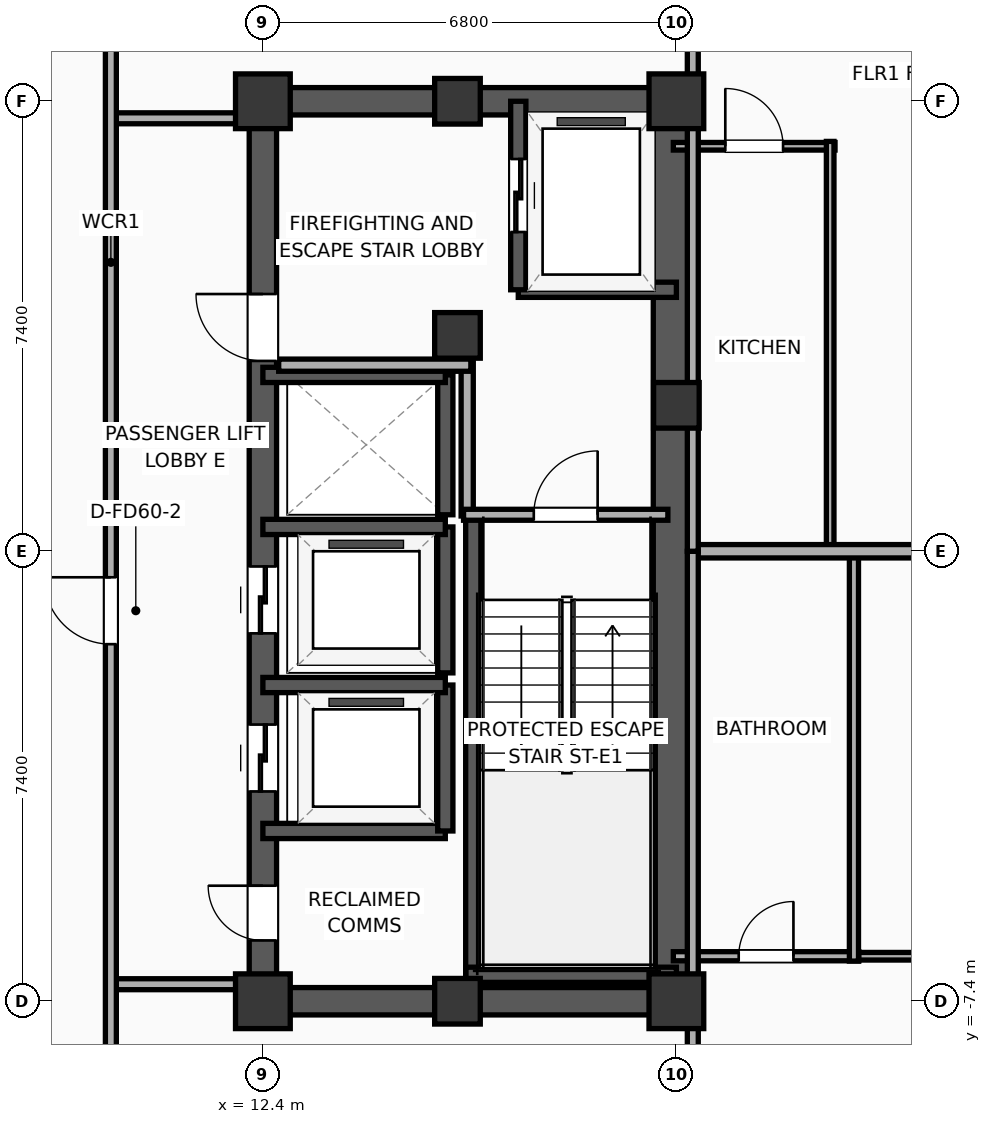
"""IFC4 building model, lengths in metres.
Left out: names, types, materials, properties, quantities, classifications, styles, units other than length and angle.
Written with IfcOpenShell. Run it as: python <this file> out.ifc"""

import sys

from ifc_helpers import new_model, si_unit, direction, frame, frame_2d, origin, origin_2d, place, context, subcontext, project, spatial, rectangle, extrude, element, fill, save


model = new_model("IFC4")
c1 = context("Model", 3, precision=1e-05, world=origin(), true_north=direction((0.0, 1.0)))
c2 = subcontext(c1, "Body", "Model", "MODEL_VIEW")
j1 = project(units=[si_unit("LENGTHUNIT", "METRE"), si_unit("PLANEANGLEUNIT", "RADIAN")], contexts=[c1])
p1 = place(None, origin())
s1 = spatial("IfcSite", under=j1, at=p1, CompositionType="ELEMENT")
p2 = place(p1, origin())
s2 = spatial("IfcBuilding", under=s1, at=p2, CompositionType="ELEMENT")
p3 = place(p2, frame((0.0, 0.0, 183.3)))
s3 = spatial("IfcBuildingStorey", under=s2, at=p3, CompositionType="ELEMENT", Elevation=183.3)
p4 = place(p3, frame((12.4, -7.4, 0.0), z_axis=(0.0, 0.0, 1.0), x_axis=(1.0, 0.0, 0.0)))
e1 = element("IfcColumn", 1, at=p4, inside=s3, PredefinedType="COLUMN", context=c2, shape_type="SweptSolid", body=[
    extrude(rectangle(XDim=0.9, YDim=0.9, at=origin_2d()), origin(), (0.0, 0.0, 1.0), 3.9),
])
p5 = place(p3, frame((15.6, 3.55, 0.0), z_axis=(0.0, 0.0, 1.0), x_axis=(1.0, 0.0, 0.0)))
e2 = element("IfcColumn", 2, at=p5, inside=s3, PredefinedType="COLUMN", context=c2, shape_type="SweptSolid", body=[
    extrude(rectangle(XDim=0.75, YDim=0.75, at=origin_2d()), origin(), (0.0, 0.0, 1.0), 3.9),
])
p6 = place(p3, frame((12.4, 7.4, 0.0), z_axis=(0.0, 0.0, 1.0), x_axis=(1.0, 0.0, 0.0)))
e3 = element("IfcColumn", 3, at=p6, inside=s3, PredefinedType="COLUMN", context=c2, shape_type="SweptSolid", body=[
    extrude(rectangle(XDim=0.9, YDim=0.9, at=origin_2d()), origin(), (0.0, 0.0, 1.0), 3.9),
])
for number, where, z_axis, x_axis in (
    (4, (15.6, -7.4, 0.0), (0.0, 0.0, 1.0), (1.0, 0.0, 0.0)),
    (5, (15.6, 7.4, 0.0), (0.0, 0.0, 1.0), (1.0, 0.0, 0.0)),
):
    element("IfcColumn", number, at=place(p3, frame(where, z_axis=z_axis, x_axis=x_axis)), inside=s3, PredefinedType="COLUMN", context=c2, shape_type="SweptSolid", body=[
        extrude(rectangle(XDim=0.75, YDim=0.75, at=origin_2d()), origin(), (0.0, 0.0, 1.0), 3.9),
    ])
p7 = place(p3, frame((19.2, -7.4, 0.0), z_axis=(0.0, 0.0, 1.0), x_axis=(1.0, 0.0, 0.0)))
e6 = element("IfcColumn", 6, at=p7, inside=s3, PredefinedType="COLUMN", context=c2, shape_type="SweptSolid", body=[
    extrude(rectangle(XDim=0.9, YDim=0.9, at=origin_2d()), origin(), (0.0, 0.0, 1.0), 3.9),
])
p8 = place(p3, frame((19.2, 2.4, 0.0), z_axis=(0.0, 0.0, 1.0), x_axis=(1.0, 0.0, 0.0)))
e7 = element("IfcColumn", 7, at=p8, inside=s3, PredefinedType="COLUMN", context=c2, shape_type="SweptSolid", body=[
    extrude(rectangle(XDim=0.75, YDim=0.75, at=origin_2d()), origin(), (0.0, 0.0, 1.0), 3.9),
])
p9 = place(p3, frame((19.2, 7.4, 0.0), z_axis=(0.0, 0.0, 1.0), x_axis=(1.0, 0.0, 0.0)))
e8 = element("IfcColumn", 8, at=p9, inside=s3, PredefinedType="COLUMN", context=c2, shape_type="SweptSolid", body=[
    extrude(rectangle(XDim=0.9, YDim=0.9, at=origin_2d()), origin(), (0.0, 0.0, 1.0), 3.9),
])
for number, where, z_axis, x_axis in (
    (9, (12.175, -7.4, 0.0), (0.0, 0.0, 1.0), (1.0, 0.0, 0.0)),
    (10, (12.175, 7.4, 0.0), (0.0, 0.0, 1.0), (1.0, 0.0, 0.0)),
):
    element("IfcWall", number, at=place(p3, frame(where, z_axis=z_axis, x_axis=x_axis)), inside=s3, PredefinedType="SHEAR", context=c2, shape_type="SweptSolid", body=[
        extrude(rectangle(XDim=7.25, YDim=0.45, at=frame_2d((3.625, 0.0))), origin(), (0.0, 0.0, 1.0), 3.65),
    ])
p10 = place(p3, frame((12.4, -7.4, 0.0), z_axis=(0.0, 0.0, 1.0), x_axis=(0.0, 1.0, 0.0)))
e11 = element("IfcWall", 11, at=p10, inside=s3, PredefinedType="SHEAR", context=c2, shape_type="SweptSolid", body=[
    extrude(rectangle(XDim=14.8, YDim=0.45, at=frame_2d((7.4, 0.0))), origin(), (0.0, 0.0, 1.0), 3.65),
])
p11 = place(p10, frame((3.45, 0.0, 0.0)))
e12 = element("IfcOpeningElement", 12, at=p11, cuts=e11, PredefinedType="OPENING", context=c2, shape_type="SweptSolid", body=[
    extrude(rectangle(XDim=1.1, YDim=2.05, at=frame_2d((0.55, 1.025))), frame((0.0, 0.235, 0.0), z_axis=(0.0, -1.0, 0.0), x_axis=(1.0, 0.0, 0.0)), (0.0, 0.0, 1.0), 0.47),
])
p12 = place(p10, frame((6.05, 0.0, 0.0)))
e13 = element("IfcOpeningElement", 13, at=p12, cuts=e11, PredefinedType="OPENING", context=c2, shape_type="SweptSolid", body=[
    extrude(rectangle(XDim=1.1, YDim=2.05, at=frame_2d((0.55, 1.025))), frame((0.0, 0.235, 0.0), z_axis=(0.0, -1.0, 0.0), x_axis=(1.0, 0.0, 0.0)), (0.0, 0.0, 1.0), 0.47),
])
p13 = place(p10, frame((10.53, 0.0, 0.0)))
e14 = element("IfcOpeningElement", 14, at=p13, cuts=e11, PredefinedType="OPENING", context=c2, shape_type="SweptSolid", body=[
    extrude(rectangle(XDim=1.1, YDim=2.05, at=frame_2d((0.55, 1.025))), frame((0.0, 0.235, 0.0), z_axis=(0.0, -1.0, 0.0), x_axis=(1.0, 0.0, 0.0)), (0.0, 0.0, 1.0), 0.47),
])
p14 = place(p10, frame((1.0, 0.0, 0.0)))
e15 = element("IfcOpeningElement", 15, at=p14, cuts=e11, PredefinedType="OPENING", context=c2, shape_type="SweptSolid", body=[
    extrude(rectangle(XDim=0.9, YDim=2.05, at=frame_2d((0.45, 1.025))), frame((0.0, 0.235, 0.0), z_axis=(0.0, -1.0, 0.0), x_axis=(1.0, 0.0, 0.0)), (0.0, 0.0, 1.0), 0.47),
])
p15 = place(p3, frame((19.145, -7.4, 0.0), z_axis=(0.0, 0.0, 1.0), x_axis=(0.0, 1.0, 0.0)))
e16 = element("IfcWall", 16, at=p15, inside=s3, PredefinedType="SHEAR", context=c2, shape_type="SweptSolid", body=[
    extrude(rectangle(XDim=14.8, YDim=0.65, at=frame_2d((7.4, 0.0))), origin(), (0.0, 0.0, 1.0), 3.65),
])
p16 = place(p3, frame((15.86, -7.085, 0.0), z_axis=(0.0, 0.0, 1.0), x_axis=(0.0, 1.0, 0.0)))
e17 = element("IfcWall", 17, at=p16, inside=s3, PredefinedType="SOLIDWALL", context=c2, shape_type="SweptSolid", body=[
    extrude(rectangle(XDim=7.685, YDim=0.25, at=frame_2d((3.843, 0.0))), origin(), (0.0, 0.0, 1.0), 3.65),
])
p17 = place(p3, frame((15.74, -6.965, 0.0), z_axis=(0.0, 0.0, 1.0), x_axis=(1.0, 0.0, 0.0)))
e18 = element("IfcWall", 18, at=p17, inside=s3, PredefinedType="SOLIDWALL", context=c2, shape_type="SweptSolid", body=[
    extrude(rectangle(XDim=3.46, YDim=0.25, at=frame_2d((1.73, 0.0))), origin(), (0.0, 0.0, 1.0), 3.65),
])
p18 = place(p3, frame((16.6, 4.3, 0.0), z_axis=(0.0, 0.0, 1.0), x_axis=(1.0, 0.0, 0.0)))
e19 = element("IfcWall", 19, at=p18, inside=s3, PredefinedType="SOLIDWALL", context=c2, shape_type="SweptSolid", body=[
    extrude(rectangle(XDim=2.6, YDim=0.25, at=frame_2d((1.3, 0.0))), origin(), (0.0, 0.0, 1.0), 3.65),
])
p19 = place(p3, frame((16.6, 7.4, 0.0), z_axis=(0.0, 0.0, 1.0), x_axis=(0.0, -1.0, 0.0)))
e20 = element("IfcWall", 20, at=p19, inside=s3, PredefinedType="SOLIDWALL", context=c2, shape_type="SweptSolid", body=[
    extrude(rectangle(XDim=3.1, YDim=0.25, at=frame_2d((1.55, 0.0))), origin(), (0.0, 0.0, 1.0), 3.65),
])
p20 = place(p19, frame((0.95, 0.0, 0.0)))
e21 = element("IfcOpeningElement", 21, at=p20, cuts=e20, PredefinedType="OPENING", context=c2, shape_type="SweptSolid", body=[
    extrude(rectangle(XDim=1.2, YDim=2.05, at=frame_2d((0.6, 1.025))), frame((0.0, 0.135, 0.0), z_axis=(0.0, -1.0, 0.0), x_axis=(1.0, 0.0, 0.0)), (0.0, 0.0, 1.0), 0.27),
])
p21 = place(p3, frame((12.4, -4.6, 0.0), z_axis=(0.0, 0.0, 1.0), x_axis=(1.0, 0.0, 0.0)))
e22 = element("IfcWall", 22, at=p21, inside=s3, PredefinedType="SOLIDWALL", context=c2, shape_type="SweptSolid", body=[
    extrude(rectangle(XDim=3.0, YDim=0.25, at=frame_2d((1.5, 0.0))), origin(), (0.0, 0.0, 1.0), 3.65),
])
p22 = place(p3, frame((15.4, -4.6, 0.0), z_axis=(0.0, 0.0, 1.0), x_axis=(0.0, 1.0, 0.0)))
e23 = element("IfcWall", 23, at=p22, inside=s3, PredefinedType="SOLIDWALL", context=c2, shape_type="SweptSolid", body=[
    extrude(rectangle(XDim=2.4, YDim=0.25, at=frame_2d((1.2, 0.0))), origin(), (0.0, 0.0, 1.0), 3.65),
])
p23 = place(p3, frame((15.4, -2.2, 0.0), z_axis=(0.0, 0.0, 1.0), x_axis=(-1.0, 0.0, 0.0)))
e24 = element("IfcWall", 24, at=p23, inside=s3, PredefinedType="SOLIDWALL", context=c2, shape_type="SweptSolid", body=[
    extrude(rectangle(XDim=3.0, YDim=0.25, at=frame_2d((1.5, 0.0))), origin(), (0.0, 0.0, 1.0), 3.65),
])
p24 = place(p3, frame((15.4, -2.0, 0.0), z_axis=(0.0, 0.0, 1.0), x_axis=(0.0, 1.0, 0.0)))
e25 = element("IfcWall", 25, at=p24, inside=s3, PredefinedType="SOLIDWALL", context=c2, shape_type="SweptSolid", body=[
    extrude(rectangle(XDim=2.4, YDim=0.25, at=frame_2d((1.2, 0.0))), origin(), (0.0, 0.0, 1.0), 3.65),
])
p25 = place(p3, frame((15.4, 0.4, 0.0), z_axis=(0.0, 0.0, 1.0), x_axis=(-1.0, 0.0, 0.0)))
e26 = element("IfcWall", 26, at=p25, inside=s3, PredefinedType="SOLIDWALL", context=c2, shape_type="SweptSolid", body=[
    extrude(rectangle(XDim=3.0, YDim=0.25, at=frame_2d((1.5, 0.0))), origin(), (0.0, 0.0, 1.0), 3.65),
])
p26 = place(p3, frame((15.4, 0.6, 0.0), z_axis=(0.0, 0.0, 1.0), x_axis=(0.0, 1.0, 0.0)))
e27 = element("IfcWall", 27, at=p26, inside=s3, PredefinedType="SOLIDWALL", context=c2, shape_type="SweptSolid", body=[
    extrude(rectangle(XDim=2.3, YDim=0.25, at=frame_2d((1.15, 0.0))), origin(), (0.0, 0.0, 1.0), 3.65),
])
p27 = place(p3, frame((15.4, 2.9, 0.0), z_axis=(0.0, 0.0, 1.0), x_axis=(-1.0, 0.0, 0.0)))
e28 = element("IfcWall", 28, at=p27, inside=s3, PredefinedType="SOLIDWALL", context=c2, shape_type="SweptSolid", body=[
    extrude(rectangle(XDim=3.0, YDim=0.25, at=frame_2d((1.5, 0.0))), origin(), (0.0, 0.0, 1.0), 3.65),
])
p28 = place(p3, frame((15.76, 0.58, 0.0), z_axis=(0.0, 0.0, 1.0), x_axis=(0.0, 1.0, 0.0)))
e29 = element("IfcWall", 29, at=p28, inside=s3, PredefinedType="PARTITIONING", context=c2, shape_type="SweptSolid", body=[
    extrude(rectangle(XDim=2.52, YDim=0.2, at=frame_2d((1.26, 0.0))), origin(), (0.0, 0.0, 1.0), 3.65),
])
p29 = place(p3, frame((12.66, 3.06, 0.0), z_axis=(0.0, 0.0, 1.0), x_axis=(1.0, 0.0, 0.0)))
e30 = element("IfcWall", 30, at=p29, inside=s3, PredefinedType="PARTITIONING", context=c2, shape_type="SweptSolid", body=[
    extrude(rectangle(XDim=3.16, YDim=0.2, at=frame_2d((1.58, 0.0))), origin(), (0.0, 0.0, 1.0), 3.65),
])
p30 = place(p3, frame((15.7, 0.6, 0.0), z_axis=(0.0, 0.0, 1.0), x_axis=(1.0, 0.0, 0.0)))
e31 = element("IfcWall", 31, at=p30, inside=s3, PredefinedType="PARTITIONING", context=c2, shape_type="SweptSolid", body=[
    extrude(rectangle(XDim=3.36, YDim=0.18, at=frame_2d((1.68, 0.0))), origin(), (0.0, 0.0, 1.0), 3.65),
])
p31 = place(p30, frame((1.155, 0.0, 0.0)))
e32 = element("IfcOpeningElement", 32, at=p31, cuts=e31, PredefinedType="OPENING", context=c2, shape_type="SweptSolid", body=[
    extrude(rectangle(XDim=1.05, YDim=2.05, at=frame_2d((0.525, 1.025))), frame((0.0, 0.1, 0.0), z_axis=(0.0, -1.0, 0.0), x_axis=(1.0, 0.0, 0.0)), (0.0, 0.0, 1.0), 0.2),
])
for number, where, z_axis, x_axis in (
    (33, (9.88, 7.12, 0.0), (0.0, 0.0, 1.0), (1.0, 0.0, 0.0)),
    (34, (9.88, -7.12, 0.0), (0.0, 0.0, 1.0), (1.0, 0.0, 0.0)),
):
    element("IfcWall", number, at=place(p3, frame(where, z_axis=z_axis, x_axis=x_axis)), inside=s3, PredefinedType="PARTITIONING", context=c2, shape_type="SweptSolid", body=[
        extrude(rectangle(XDim=2.27, YDim=0.18, at=frame_2d((1.135, 0.0))), origin(), (0.0, 0.0, 1.0), 3.65),
    ])
p32 = place(p3, frame((9.9, -9.78, 0.0), z_axis=(0.0, 0.0, 1.0), x_axis=(0.0, 1.0, 0.0)))
e35 = element("IfcWall", 35, at=p32, inside=s3, PredefinedType="PARTITIONING", context=c2, shape_type="SweptSolid", body=[
    extrude(rectangle(XDim=19.56, YDim=0.18, at=frame_2d((9.78, 0.0))), origin(), (0.0, 0.0, 1.0), 3.65),
])
p33 = place(p32, frame((8.252, 0.0, 0.0)))
e36 = element("IfcOpeningElement", 36, at=p33, cuts=e35, PredefinedType="OPENING", context=c2, shape_type="SweptSolid", body=[
    extrude(rectangle(XDim=1.1, YDim=2.05, at=frame_2d((0.55, 1.025))), frame((0.0, 0.1, 0.0), z_axis=(0.0, -1.0, 0.0), x_axis=(1.0, 0.0, 0.0)), (0.0, 0.0, 1.0), 0.2),
])
p34 = place(p3, frame((22.06, -6.66, 0.0), z_axis=(0.0, 0.0, 1.0), x_axis=(1.0, 0.0, 0.0)))
e37 = element("IfcWall", 37, at=p34, inside=s3, PredefinedType="PARTITIONING", context=c2, shape_type="SweptSolid", body=[
    extrude(rectangle(XDim=5.321, YDim=0.125, at=frame_2d((2.661, 0.0))), origin(), (0.0, 0.0, 1.0), 3.65),
])
p35 = place(p34, frame((1.945, 0.0, 0.0)))
e38 = element("IfcOpeningElement", 38, at=p35, cuts=e37, PredefinedType="OPENING", context=c2, shape_type="SweptSolid", body=[
    extrude(rectangle(XDim=0.9, YDim=2.05, at=frame_2d((0.45, 1.025))), frame((0.0, 0.073, 0.0), z_axis=(0.0, -1.0, 0.0), x_axis=(1.0, 0.0, 0.0)), (0.0, 0.0, 1.0), 0.145),
])
p36 = place(p3, frame((19.15, -6.66, 0.0), z_axis=(0.0, 0.0, 1.0), x_axis=(1.0, 0.0, 0.0)))
e39 = element("IfcWall", 39, at=p36, inside=s3, PredefinedType="PLUMBINGWALL", context=c2, shape_type="SweptSolid", body=[
    extrude(rectangle(XDim=3.05, YDim=0.15, at=frame_2d((1.525, 0.0))), origin(), (0.0, 0.0, 1.0), 3.04),
])
p37 = place(p36, frame((1.075, 0.0, 0.0)))
e40 = element("IfcOpeningElement", 40, at=p37, cuts=e39, PredefinedType="OPENING", context=c2, shape_type="SweptSolid", body=[
    extrude(rectangle(XDim=0.9, YDim=2.05, at=frame_2d((0.45, 1.025))), frame((0.0, 0.085, 0.0), z_axis=(0.0, -1.0, 0.0), x_axis=(1.0, 0.0, 0.0)), (0.0, 0.0, 1.0), 0.17),
])
p38 = place(p3, frame((22.12, -6.74, 0.0), z_axis=(0.0, 0.0, 1.0), x_axis=(0.0, 1.0, 0.0)))
e41 = element("IfcWall", 41, at=p38, inside=s3, PredefinedType="PLUMBINGWALL", context=c2, shape_type="SweptSolid", body=[
    extrude(rectangle(XDim=6.72, YDim=0.15, at=frame_2d((3.36, 0.0))), origin(), (0.0, 0.0, 1.0), 3.65),
])
p39 = place(p3, frame((19.15, 6.66, 0.0), z_axis=(0.0, 0.0, 1.0), x_axis=(1.0, 0.0, 0.0)))
e42 = element("IfcWall", 42, at=p39, inside=s3, PredefinedType="PARTITIONING", context=c2, shape_type="SweptSolid", body=[
    extrude(rectangle(XDim=2.659, YDim=0.125, at=frame_2d((1.33, 0.0))), origin(), (0.0, 0.0, 1.0), 3.65),
])
p40 = place(p39, frame((0.854, 0.0, 0.0)))
e43 = element("IfcOpeningElement", 43, at=p40, cuts=e42, PredefinedType="OPENING", context=c2, shape_type="SweptSolid", body=[
    extrude(rectangle(XDim=0.95, YDim=2.05, at=frame_2d((0.475, 1.025))), frame((0.0, 0.073, 0.0), z_axis=(0.0, -1.0, 0.0), x_axis=(1.0, 0.0, 0.0)), (0.0, 0.0, 1.0), 0.145),
])
p41 = place(p3, frame((21.729, 0.02, 0.0), z_axis=(0.0, 0.0, 1.0), x_axis=(0.0, 1.0, 0.0)))
e44 = element("IfcWall", 44, at=p41, inside=s3, PredefinedType="PARTITIONING", context=c2, shape_type="SweptSolid", body=[
    extrude(rectangle(XDim=6.72, YDim=0.125, at=frame_2d((3.36, 0.0))), origin(), (0.0, 0.0, 1.0), 3.65),
])
p42 = place(p3, frame((19.47, 0.0, 0.0), z_axis=(0.0, 0.0, 1.0), x_axis=(1.0, 0.0, 0.0)))
e45 = element("IfcWall", 45, at=p42, inside=s3, PredefinedType="PARTITIONING", context=c2, shape_type="SweptSolid", body=[
    extrude(rectangle(XDim=7.06, YDim=0.22, at=frame_2d((3.53, 0.0))), origin(), (0.0, 0.0, 1.0), 3.65),
])
p43 = place(p3, frame((19.47, -18.559, 0.0), z_axis=(0.0, 0.0, 1.0), x_axis=(0.0, 1.0, 0.0)))
e46 = element("IfcWall", 46, at=p43, inside=s3, PredefinedType="PARTITIONING", context=c2, shape_type="SweptSolid", body=[
    extrude(rectangle(XDim=18.559, YDim=0.18, at=frame_2d((9.279, 0.0))), origin(), (0.0, 0.0, 1.0), 3.65),
])
p44 = place(p43, frame((7.679, 0.0, 0.0)))
e47 = element("IfcOpeningElement", 47, at=p44, cuts=e46, PredefinedType="OPENING", context=c2, shape_type="SweptSolid", body=[
    extrude(rectangle(XDim=0.9, YDim=2.05, at=frame_2d((0.45, 1.025))), frame((0.0, 0.1, 0.0), z_axis=(0.0, -1.0, 0.0), x_axis=(1.0, 0.0, 0.0)), (0.0, 0.0, 1.0), 0.2),
])
p45 = place(p3, frame((19.47, 0.0, 0.0), z_axis=(0.0, 0.0, 1.0), x_axis=(0.0, 1.0, 0.0)))
e48 = element("IfcWall", 48, at=p45, inside=s3, PredefinedType="PARTITIONING", context=c2, shape_type="SweptSolid", body=[
    extrude(rectangle(XDim=22.124, YDim=0.18, at=frame_2d((11.062, 0.0))), origin(), (0.0, 0.0, 1.0), 3.04),
])
p46 = place(p45, frame((9.979, 0.0, 0.0)))
e49 = element("IfcOpeningElement", 49, at=p46, cuts=e48, PredefinedType="OPENING", context=c2, shape_type="SweptSolid", body=[
    extrude(rectangle(XDim=0.9, YDim=2.05, at=frame_2d((0.45, 1.025))), frame((0.0, 0.1, 0.0), z_axis=(0.0, -1.0, 0.0), x_axis=(1.0, 0.0, 0.0)), (0.0, 0.0, 1.0), 0.2),
])
p47 = place(p20, origin())
e50 = element("IfcDoor", 50, at=p47, inside=s3, OperationType="SLIDING_TO_LEFT", PredefinedType="DOOR", context=c2, shape_type="SweptSolid", body=[
    extrude(rectangle(XDim=1.2, YDim=2.05, at=frame_2d((0.6, 1.025))), frame((0.0, 0.025, 0.0), z_axis=(0.0, -1.0, 0.0), x_axis=(1.0, 0.0, 0.0)), (0.0, 0.0, 1.0), 0.05),
])
fill(e21, e50)
p48 = place(p11, origin())
e51 = element("IfcDoor", 51, at=p48, inside=s3, OperationType="SLIDING_TO_LEFT", PredefinedType="DOOR", context=c2, shape_type="SweptSolid", body=[
    extrude(rectangle(XDim=1.1, YDim=2.05, at=frame_2d((0.55, 1.025))), frame((0.0, 0.025, 0.0), z_axis=(0.0, -1.0, 0.0), x_axis=(1.0, 0.0, 0.0)), (0.0, 0.0, 1.0), 0.05),
])
fill(e12, e51)
p49 = place(p12, origin())
e52 = element("IfcDoor", 52, at=p49, inside=s3, OperationType="SLIDING_TO_LEFT", PredefinedType="DOOR", context=c2, shape_type="SweptSolid", body=[
    extrude(rectangle(XDim=1.1, YDim=2.05, at=frame_2d((0.55, 1.025))), frame((0.0, 0.025, 0.0), z_axis=(0.0, -1.0, 0.0), x_axis=(1.0, 0.0, 0.0)), (0.0, 0.0, 1.0), 0.05),
])
fill(e13, e52)
p50 = place(p31, origin())
e53 = element("IfcDoor", 53, at=p50, inside=s3, OperationType="SINGLE_SWING_RIGHT", PredefinedType="DOOR", context=c2, shape_type="SweptSolid", body=[
    extrude(rectangle(XDim=1.05, YDim=2.05, at=frame_2d((0.525, 1.025))), frame((0.0, 0.025, 0.0), z_axis=(0.0, -1.0, 0.0), x_axis=(1.0, 0.0, 0.0)), (0.0, 0.0, 1.0), 0.05),
])
fill(e32, e53)
p51 = place(p33, origin())
e54 = element("IfcDoor", 54, at=p51, inside=s3, OperationType="SINGLE_SWING_RIGHT", PredefinedType="DOOR", context=c2, shape_type="SweptSolid", body=[
    extrude(rectangle(XDim=1.1, YDim=2.05, at=frame_2d((0.55, 1.025))), frame((0.0, 0.025, 0.0), z_axis=(0.0, -1.0, 0.0), x_axis=(1.0, 0.0, 0.0)), (0.0, 0.0, 1.0), 0.05),
])
fill(e36, e54)
p52 = place(p37, origin())
e55 = element("IfcDoor", 55, at=p52, inside=s3, OperationType="SINGLE_SWING_RIGHT", PredefinedType="DOOR", context=c2, shape_type="SweptSolid", body=[
    extrude(rectangle(XDim=0.9, YDim=2.05, at=frame_2d((0.45, 1.025))), frame((0.0, 0.025, 0.0), z_axis=(0.0, -1.0, 0.0), x_axis=(1.0, 0.0, 0.0)), (0.0, 0.0, 1.0), 0.05),
])
fill(e40, e55)
p53 = place(p40, origin())
e56 = element("IfcDoor", 56, at=p53, inside=s3, OperationType="SINGLE_SWING_LEFT", PredefinedType="DOOR", context=c2, shape_type="SweptSolid", body=[
    extrude(rectangle(XDim=0.95, YDim=2.05, at=frame_2d((0.475, 1.025))), frame((0.0, 0.025, 0.0), z_axis=(0.0, -1.0, 0.0), x_axis=(1.0, 0.0, 0.0)), (0.0, 0.0, 1.0), 0.05),
])
fill(e43, e56)
p54 = place(p13, origin())
e57 = element("IfcDoor", 57, at=p54, inside=s3, OperationType="SINGLE_SWING_RIGHT", PredefinedType="DOOR", context=c2, shape_type="SweptSolid", body=[
    extrude(rectangle(XDim=1.1, YDim=2.05, at=frame_2d((0.55, 1.025))), frame((0.0, 0.025, 0.0), z_axis=(0.0, -1.0, 0.0), x_axis=(1.0, 0.0, 0.0)), (0.0, 0.0, 1.0), 0.05),
])
fill(e14, e57)
p55 = place(p14, origin())
e58 = element("IfcDoor", 58, at=p55, inside=s3, OperationType="SINGLE_SWING_RIGHT", PredefinedType="DOOR", context=c2, shape_type="SweptSolid", body=[
    extrude(rectangle(XDim=0.9, YDim=2.05, at=frame_2d((0.45, 1.025))), frame((0.0, 0.025, 0.0), z_axis=(0.0, -1.0, 0.0), x_axis=(1.0, 0.0, 0.0)), (0.0, 0.0, 1.0), 0.05),
])
fill(e15, e58)
save(model, sys.argv[1])
